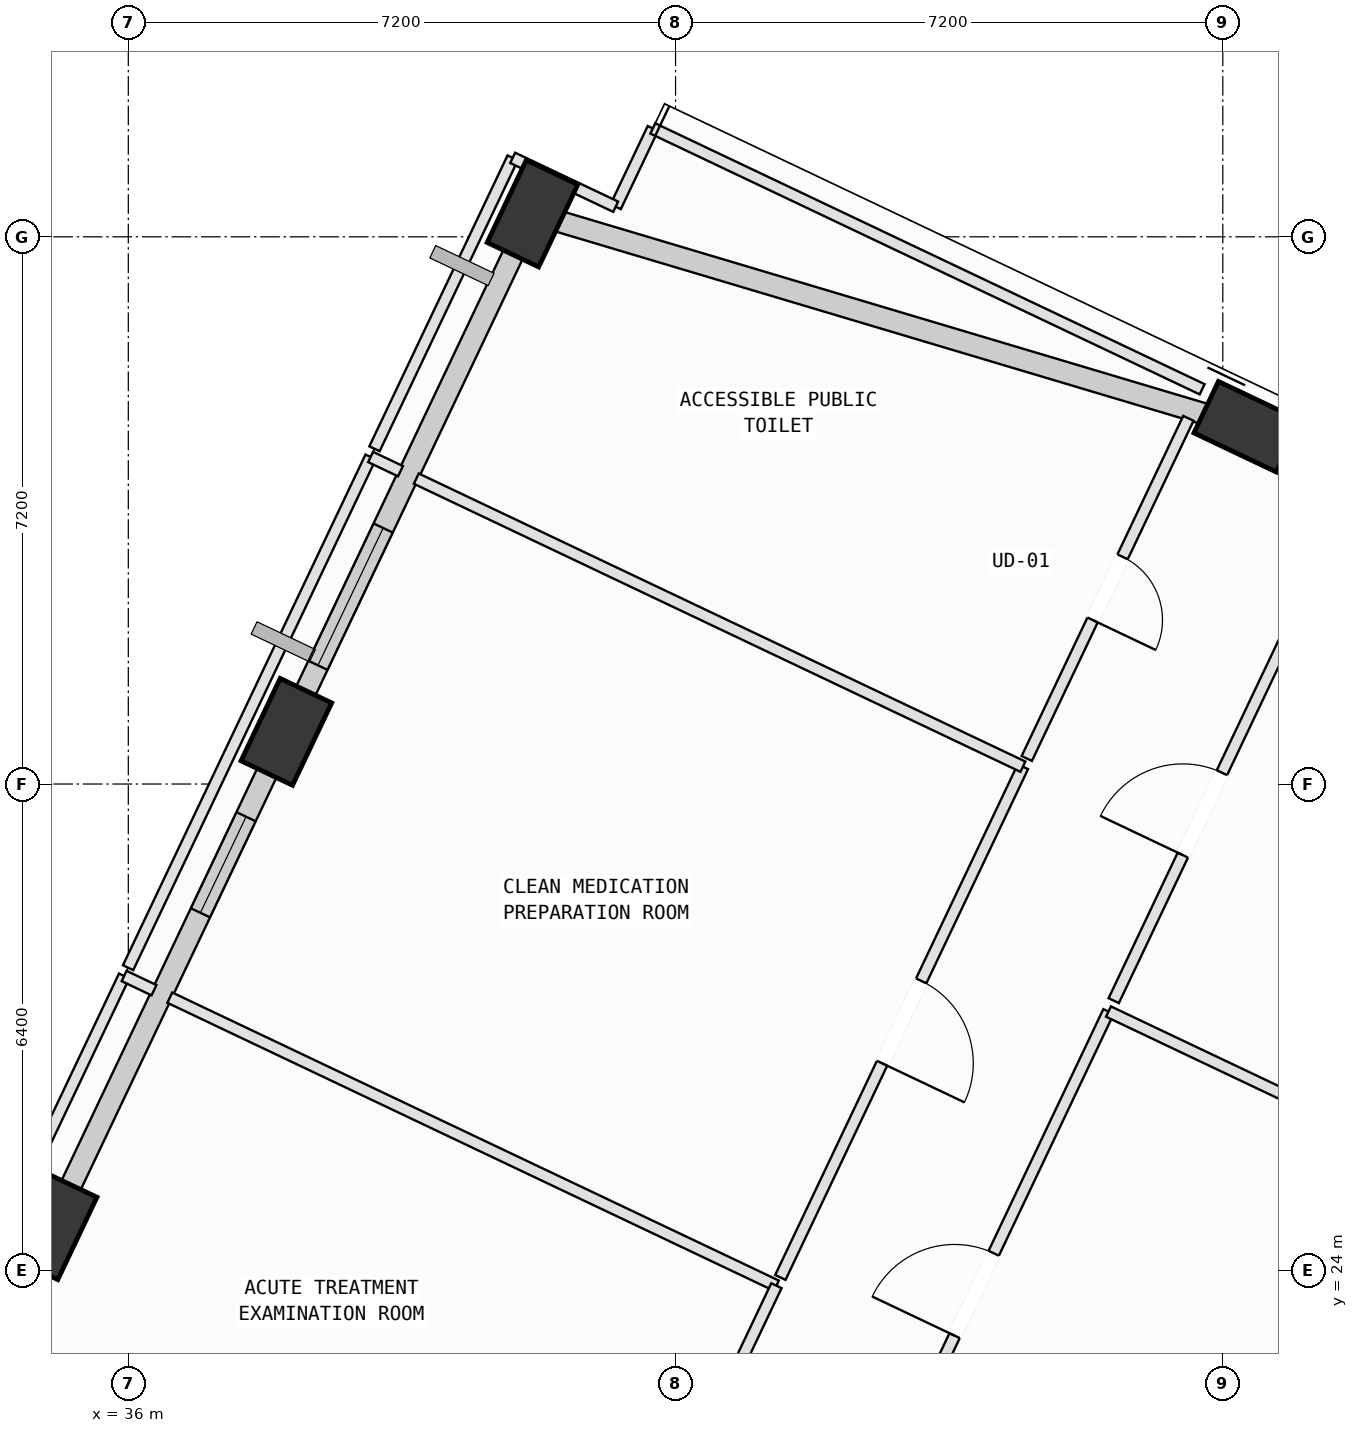
"""IFC4 building model, lengths in metres.
Left out: names, types, materials, properties, quantities, classifications, styles, units other than length and angle.
Written with IfcOpenShell. Run it as: python <this file> out.ifc"""

import sys

from ifc_helpers import new_model, si_unit, direction, frame, frame_2d, origin, origin_2d, place, context, subcontext, project, spatial, rectangle, extrude, element, fill, save


model = new_model("IFC4")
c1 = context("Model", 3, precision=1e-05, world=origin(), true_north=direction((0.0, 1.0)))
c2 = subcontext(c1, "Body", "Model", "MODEL_VIEW")
j1 = project(units=[si_unit("LENGTHUNIT", "METRE"), si_unit("PLANEANGLEUNIT", "RADIAN")], contexts=[c1])
p1 = place(None, origin())
s1 = spatial("IfcSite", under=j1, at=p1, CompositionType="ELEMENT")
p2 = place(p1, origin())
s2 = spatial("IfcBuilding", under=s1, at=p2, CompositionType="ELEMENT")
p3 = place(p2, frame((0.0, 0.0, 300.6)))
s3 = spatial("IfcBuildingStorey", under=s2, at=p3, CompositionType="ELEMENT", Elevation=300.6)
p4 = place(p3, frame((50.724, 35.101, 0.002), z_axis=(-0.043165701388, 0.070380184492, 0.996585847709), x_axis=(0.993531986514, 0.10788896323, 0.03541416928)))
e1 = element("IfcColumn", 1, at=p4, inside=s3, PredefinedType="COLUMN", context=c2, shape_type="SweptSolid", body=[
    extrude(rectangle(XDim=1.2, YDim=0.75, at=origin_2d()), origin(), (0.0, 0.0, 1.0), 4.01),
])
p5 = place(p3, frame((41.318, 37.906, 0.002), z_axis=(-0.054507164041, 0.031460510788, 0.998017637785), x_axis=(0.566397180495, -0.822169184198, 0.056851266321)))
e2 = element("IfcColumn", 2, at=p5, inside=s3, PredefinedType="COLUMN", context=c2, shape_type="SweptSolid", body=[
    extrude(rectangle(XDim=1.2, YDim=0.75, at=origin_2d()), origin(), (0.0, 0.0, 1.0), 4.004),
])
p6 = place(p3, frame((38.079, 31.086, 0.002), z_axis=(-0.026194684304, 0.018317961052, 0.999489014856), x_axis=(0.494092812205, -0.868929550231, 0.028874377268)))
e3 = element("IfcColumn", 3, at=p6, inside=s3, PredefinedType="COLUMN", context=c2, shape_type="SweptSolid", body=[
    extrude(rectangle(XDim=1.2, YDim=0.75, at=origin_2d()), origin(), (0.0, 0.0, 1.0), 3.998),
])
p7 = place(p3, frame((34.991, 24.582, 0.002), z_axis=(0.000855260499, 0.005803553386, 0.999982793501), x_axis=(-0.556050371387, -0.83113170028, 0.005299176292)))
e4 = element("IfcColumn", 4, at=p7, inside=s3, PredefinedType="COLUMN", context=c2, shape_type="SweptSolid", body=[
    extrude(rectangle(XDim=1.2, YDim=0.75, at=origin_2d()), origin(), (0.0, 0.0, 1.0), 3.996),
])
p8 = place(p3, frame((50.948, 34.994, 0.0), z_axis=(0.0, 0.0, 1.0), x_axis=(0.903327518923, -0.428951504901, 0.0)))
e5 = element("IfcWall", 5, at=p8, inside=s3, PredefinedType="SOLIDWALL", context=c2, shape_type="SweptSolid", body=[
    extrude(rectangle(XDim=7.046, YDim=0.28, at=frame_2d((3.523, 0.0))), origin(), (0.0, 0.0, 1.0), 3.265),
])
p9 = place(p3, frame((41.58, 37.828, 0.0), z_axis=(0.0, 0.0, 1.0), x_axis=(0.958274258343, -0.285850390585, 0.0)))
e6 = element("IfcWall", 6, at=p9, inside=s3, PredefinedType="SOLIDWALL", context=c2, shape_type="SweptSolid", body=[
    extrude(rectangle(XDim=9.036, YDim=0.28, at=frame_2d((4.518, 0.0))), origin(), (0.0, 0.0, 1.0), 3.265),
])
p10 = place(p3, frame((38.252, 31.45, 0.0), z_axis=(0.0, 0.0, 1.0), x_axis=(0.428943696589, 0.903331226714, 0.0)))
e7 = element("IfcWall", 7, at=p10, inside=s3, PredefinedType="SOLIDWALL", context=c2, shape_type="SweptSolid", body=[
    extrude(rectangle(XDim=6.78, YDim=0.28, at=frame_2d((3.39, 0.0))), origin(), (0.0, 0.0, 1.0), 3.265),
])
p11 = place(p10, frame((0.566, 0.0, 0.75)))
e8 = element("IfcOpeningElement", 8, at=p11, cuts=e7, PredefinedType="OPENING", context=c2, shape_type="SweptSolid", body=[
    extrude(rectangle(XDim=2.0, YDim=1.95, at=frame_2d((1.0, 0.975))), frame((0.0, 0.15, 0.0), z_axis=(0.0, -1.0, 0.0), x_axis=(1.0, 0.0, 0.0)), (0.0, 0.0, 1.0), 0.3),
])
p12 = place(p3, frame((35.167, 24.951, 0.0), z_axis=(0.0, 0.0, 1.0), x_axis=(0.42889830824, 0.903352777817, 0.0)))
e9 = element("IfcWall", 9, at=p12, inside=s3, PredefinedType="SOLIDWALL", context=c2, shape_type="SweptSolid", body=[
    extrude(rectangle(XDim=6.409, YDim=0.28, at=frame_2d((3.205, 0.0))), origin(), (0.0, 0.0, 1.0), 3.265),
])
p13 = place(p12, frame((4.156, 0.0, 0.75)))
e10 = element("IfcOpeningElement", 10, at=p13, cuts=e9, PredefinedType="OPENING", context=c2, shape_type="SweptSolid", body=[
    extrude(rectangle(XDim=1.4, YDim=1.85, at=frame_2d((0.7, 0.925))), frame((0.0, 0.15, 0.0), z_axis=(0.0, -1.0, 0.0), x_axis=(1.0, 0.0, 0.0)), (0.0, 0.0, 1.0), 0.3),
])
p14 = place(p3, frame((45.362, 19.962, 0.0), z_axis=(0.0, 0.0, 1.0), x_axis=(0.428857978155, 0.903371924831, 0.0)))
e11 = element("IfcWall", 11, at=p14, inside=s3, PredefinedType="PARTITIONING", context=c2, shape_type="SweptSolid", body=[
    extrude(rectangle(XDim=8.24, YDim=0.15, at=frame_2d((4.12, 0.0))), origin(), (0.0, 0.0, 1.0), 3.415),
])
p15 = place(p14, frame((3.52, 0.0, 0.0)))
e12 = element("IfcOpeningElement", 12, at=p15, cuts=e11, PredefinedType="OPENING", context=c2, shape_type="SweptSolid", body=[
    extrude(rectangle(XDim=1.2, YDim=2.15, at=frame_2d((0.6, 1.075))), frame((0.0, 0.085, 0.0), z_axis=(0.0, -1.0, 0.0), x_axis=(1.0, 0.0, 0.0)), (0.0, 0.0, 1.0), 0.17),
])
p16 = place(p3, frame((48.896, 27.406, 0.0), z_axis=(0.0, 0.0, 1.0), x_axis=(0.903330146776, -0.428945970871, 0.0)))
e13 = element("IfcWall", 13, at=p16, inside=s3, PredefinedType="PARTITIONING", context=c2, shape_type="SweptSolid", body=[
    extrude(rectangle(XDim=9.435, YDim=0.15, at=frame_2d((4.718, 0.0))), origin(), (0.0, 0.0, 1.0), 3.78),
])
p17 = place(p3, frame((48.965, 27.55, 0.0), z_axis=(0.0, 0.0, 1.0), x_axis=(0.428881036616, 0.903360977921, 0.0)))
e14 = element("IfcWall", 14, at=p17, inside=s3, PredefinedType="PARTITIONING", context=c2, shape_type="SweptSolid", body=[
    extrude(rectangle(XDim=5.44, YDim=0.15, at=frame_2d((2.72, 0.0))), origin(), (0.0, 0.0, 1.0), 3.78),
])
p18 = place(p17, frame((2.12, 0.0, 0.0)))
e15 = element("IfcOpeningElement", 15, at=p18, cuts=e14, PredefinedType="OPENING", context=c2, shape_type="SweptSolid", body=[
    extrude(rectangle(XDim=1.2, YDim=2.15, at=frame_2d((0.6, 1.075))), frame((0.0, 0.085, 0.0), z_axis=(0.0, -1.0, 0.0), x_axis=(1.0, 0.0, 0.0)), (0.0, 0.0, 1.0), 0.17),
])
p19 = place(p3, frame((32.624, 20.88, 0.0), z_axis=(0.0, 0.0, 1.0), x_axis=(0.428933318591, 0.903336154597, 0.0)))
e16 = element("IfcWall", 16, at=p19, inside=s3, PredefinedType="PARTITIONING", context=c2, shape_type="SweptSolid", body=[
    extrude(rectangle(XDim=7.743, YDim=0.15, at=frame_2d((3.871, 0.0))), origin(), (0.0, 0.0, 1.0), 3.78),
])
p20 = place(p3, frame((35.945, 27.874, 0.0), z_axis=(0.0, 0.0, 1.0), x_axis=(0.902902004989, -0.429846448615, 0.0)))
e17 = element("IfcWall", 17, at=p20, inside=s3, PredefinedType="PARTITIONING", context=c2, shape_type="SweptSolid", body=[
    extrude(rectangle(XDim=0.435, YDim=0.15, at=frame_2d((0.218, 0.0))), origin(), (0.0, 0.0, 1.0), 3.78),
])
p21 = place(p3, frame((36.546, 27.589, 0.0), z_axis=(0.0, 0.0, 1.0), x_axis=(0.903322745046, -0.428961558047, 0.0)))
e18 = element("IfcWall", 18, at=p21, inside=s3, PredefinedType="PARTITIONING", context=c2, shape_type="SweptSolid", body=[
    extrude(rectangle(XDim=8.835, YDim=0.15, at=frame_2d((4.418, 0.0))), origin(), (0.0, 0.0, 1.0), 3.78),
])
p22 = place(p3, frame((44.527, 23.799, 0.0), z_axis=(0.0, 0.0, 1.0), x_axis=(-0.428918545399, -0.90334316924, 0.0)))
e19 = element("IfcWall", 19, at=p22, inside=s3, PredefinedType="PARTITIONING", context=c2, shape_type="SweptSolid", body=[
    extrude(rectangle(XDim=11.562, YDim=0.15, at=frame_2d((5.781, 0.0))), origin(), (0.0, 0.0, 1.0), 3.78),
])
p23 = place(p22, frame((5.181, 0.0, 0.0)))
e20 = element("IfcOpeningElement", 20, at=p23, cuts=e19, PredefinedType="OPENING", context=c2, shape_type="SweptSolid", body=[
    extrude(rectangle(XDim=1.2, YDim=2.15, at=frame_2d((0.6, 1.075))), frame((0.0, 0.085, 0.0), z_axis=(0.0, -1.0, 0.0), x_axis=(1.0, 0.0, 0.0)), (0.0, 0.0, 1.0), 0.17),
])
p24 = place(p3, frame((47.77, 30.628, 0.0), z_axis=(0.0, 0.0, 1.0), x_axis=(-0.428939661292, -0.90333314285, 0.0)))
e21 = element("IfcWall", 21, at=p24, inside=s3, PredefinedType="PARTITIONING", context=c2, shape_type="SweptSolid", body=[
    extrude(rectangle(XDim=7.439, YDim=0.15, at=frame_2d((3.719, 0.0))), origin(), (0.0, 0.0, 1.0), 3.78),
])
p25 = place(p24, frame((3.12, 0.0, 0.0)))
e22 = element("IfcOpeningElement", 22, at=p25, cuts=e21, PredefinedType="OPENING", context=c2, shape_type="SweptSolid", body=[
    extrude(rectangle(XDim=1.2, YDim=2.15, at=frame_2d((0.6, 1.075))), frame((0.0, 0.085, 0.0), z_axis=(0.0, -1.0, 0.0), x_axis=(1.0, 0.0, 0.0)), (0.0, 0.0, 1.0), 0.17),
])
p26 = place(p3, frame((35.997, 27.983, 0.0), z_axis=(0.0, 0.0, 1.0), x_axis=(0.428939661292, 0.90333314285, 0.0)))
e23 = element("IfcWall", 23, at=p26, inside=s3, PredefinedType="PARTITIONING", context=c2, shape_type="SweptSolid", body=[
    extrude(rectangle(XDim=7.439, YDim=0.15, at=frame_2d((3.719, 0.0))), origin(), (0.0, 0.0, 1.0), 3.265),
])
p27 = place(p3, frame((39.188, 34.703, 0.0), z_axis=(0.0, 0.0, 1.0), x_axis=(0.903223141394, -0.429171244203, 0.0)))
e24 = element("IfcWall", 24, at=p27, inside=s3, PredefinedType="PARTITIONING", context=c2, shape_type="SweptSolid", body=[
    extrude(rectangle(XDim=0.435, YDim=0.15, at=frame_2d((0.218, 0.0))), origin(), (0.0, 0.0, 1.0), 3.78),
])
p28 = place(p3, frame((39.789, 34.418, 0.0), z_axis=(0.0, 0.0, 1.0), x_axis=(0.903317660318, -0.428972265487, 0.0)))
e25 = element("IfcWall", 25, at=p28, inside=s3, PredefinedType="PARTITIONING", context=c2, shape_type="SweptSolid", body=[
    extrude(rectangle(XDim=8.835, YDim=0.15, at=frame_2d((4.417, 0.0))), origin(), (0.0, 0.0, 1.0), 3.78),
])
p29 = place(p3, frame((42.412, 37.996, 0.0), z_axis=(0.0, 0.0, 1.0), x_axis=(0.428785931743, 0.903406123922, 0.0)))
e26 = element("IfcWall", 26, at=p29, inside=s3, PredefinedType="PARTITIONING", context=c2, shape_type="SweptSolid", body=[
    extrude(rectangle(XDim=1.14, YDim=0.15, at=frame_2d((0.57, 0.0))), origin(), (0.0, 0.0, 1.0), 3.78),
])
p30 = place(p3, frame((42.901, 39.026, 0.0), z_axis=(0.0, 0.0, 1.0), x_axis=(0.903324213929, -0.428958464807, 0.0)))
e27 = element("IfcWall", 27, at=p30, inside=s3, PredefinedType="PARTITIONING", context=c2, shape_type="SweptSolid", body=[
    extrude(rectangle(XDim=8.0, YDim=0.15, at=frame_2d((4.0, 0.0))), origin(), (0.0, 0.0, 1.0), 3.265),
])
p31 = place(p3, frame((49.947, 35.212, 0.0), z_axis=(0.0, 0.0, 1.0), x_axis=(-0.429049779465, -0.903280845995, 0.0)))
e28 = element("IfcWall", 28, at=p31, inside=s3, PredefinedType="PARTITIONING", context=c2, shape_type="SweptSolid", body=[
    extrude(rectangle(XDim=4.955, YDim=0.15, at=frame_2d((2.478, 0.0))), origin(), (0.0, 0.0, 1.0), 3.78),
])
p32 = place(p31, frame((2.018, 0.0, 0.0)))
e29 = element("IfcOpeningElement", 29, at=p32, cuts=e28, PredefinedType="OPENING", context=c2, shape_type="SweptSolid", body=[
    extrude(rectangle(XDim=0.92, YDim=2.1, at=frame_2d((0.46, 1.05))), frame((0.0, 0.085, 0.0), z_axis=(0.0, -1.0, 0.0), x_axis=(1.0, 0.0, 0.0)), (0.0, 0.0, 1.0), 0.17),
])
p33 = place(p3, frame((39.239, 34.811, 0.0), z_axis=(0.0, 0.0, 1.0), x_axis=(0.428985127698, 0.903311552132, 0.0)))
e30 = element("IfcWall", 30, at=p33, inside=s3, PredefinedType="PARTITIONING", context=c2, shape_type="SweptSolid", body=[
    extrude(rectangle(XDim=4.238, YDim=0.15, at=frame_2d((2.119, 0.0))), origin(), (0.0, 0.0, 1.0), 3.265),
])
p34 = place(p3, frame((41.057, 38.639, 0.0), z_axis=(0.0, 0.0, 1.0), x_axis=(0.903512345778, -0.428562062049, 0.0)))
e31 = element("IfcWall", 31, at=p34, inside=s3, PredefinedType="PARTITIONING", context=c2, shape_type="SweptSolid", body=[
    extrude(rectangle(XDim=1.5, YDim=0.15, at=frame_2d((0.75, 0.0))), origin(), (0.0, 0.0, 1.0), 3.265),
])
p35 = place(p11, origin())
e32 = element("IfcWindow", 32, at=p35, inside=s3, PartitioningType="SINGLE_PANEL", PredefinedType="WINDOW", context=c2, shape_type="SweptSolid", body=[
    extrude(rectangle(XDim=2.0, YDim=1.95, at=frame_2d((1.0, 0.975))), frame((0.0, 0.03, 0.0), z_axis=(0.0, -1.0, 0.0), x_axis=(1.0, 0.0, 0.0)), (0.0, 0.0, 1.0), 0.06),
])
fill(e8, e32)
p36 = place(p13, origin())
e33 = element("IfcWindow", 33, at=p36, inside=s3, PartitioningType="SINGLE_PANEL", PredefinedType="WINDOW", context=c2, shape_type="SweptSolid", body=[
    extrude(rectangle(XDim=1.4, YDim=1.85, at=frame_2d((0.7, 0.925))), frame((0.0, 0.03, 0.0), z_axis=(0.0, -1.0, 0.0), x_axis=(1.0, 0.0, 0.0)), (0.0, 0.0, 1.0), 0.06),
])
fill(e10, e33)
p37 = place(p15, origin())
e34 = element("IfcDoor", 34, at=p37, inside=s3, OperationType="SINGLE_SWING_LEFT", PredefinedType="DOOR", context=c2, shape_type="SweptSolid", body=[
    extrude(rectangle(XDim=1.2, YDim=2.15, at=frame_2d((0.6, 1.075))), frame((0.0, 0.025, 0.0), z_axis=(0.0, -1.0, 0.0), x_axis=(1.0, 0.0, 0.0)), (0.0, 0.0, 1.0), 0.05),
])
fill(e12, e34)
p38 = place(p18, origin())
e35 = element("IfcDoor", 35, at=p38, inside=s3, OperationType="SINGLE_SWING_LEFT", PredefinedType="DOOR", context=c2, shape_type="SweptSolid", body=[
    extrude(rectangle(XDim=1.2, YDim=2.15, at=frame_2d((0.6, 1.075))), frame((0.0, 0.025, 0.0), z_axis=(0.0, -1.0, 0.0), x_axis=(1.0, 0.0, 0.0)), (0.0, 0.0, 1.0), 0.05),
])
fill(e15, e35)
p39 = place(p25, origin())
e36 = element("IfcDoor", 36, at=p39, inside=s3, OperationType="SINGLE_SWING_RIGHT", PredefinedType="DOOR", context=c2, shape_type="SweptSolid", body=[
    extrude(rectangle(XDim=1.2, YDim=2.15, at=frame_2d((0.6, 1.075))), frame((0.0, 0.025, 0.0), z_axis=(0.0, -1.0, 0.0), x_axis=(1.0, 0.0, 0.0)), (0.0, 0.0, 1.0), 0.05),
])
fill(e22, e36)
p40 = place(p32, origin())
e37 = element("IfcDoor", 37, at=p40, inside=s3, OperationType="SINGLE_SWING_RIGHT", PredefinedType="DOOR", context=c2, shape_type="SweptSolid", body=[
    extrude(rectangle(XDim=0.92, YDim=2.1, at=frame_2d((0.46, 1.05))), frame((0.0, 0.025, 0.0), z_axis=(0.0, -1.0, 0.0), x_axis=(1.0, 0.0, 0.0)), (0.0, 0.0, 1.0), 0.05),
])
fill(e29, e37)
save(model, sys.argv[1])
